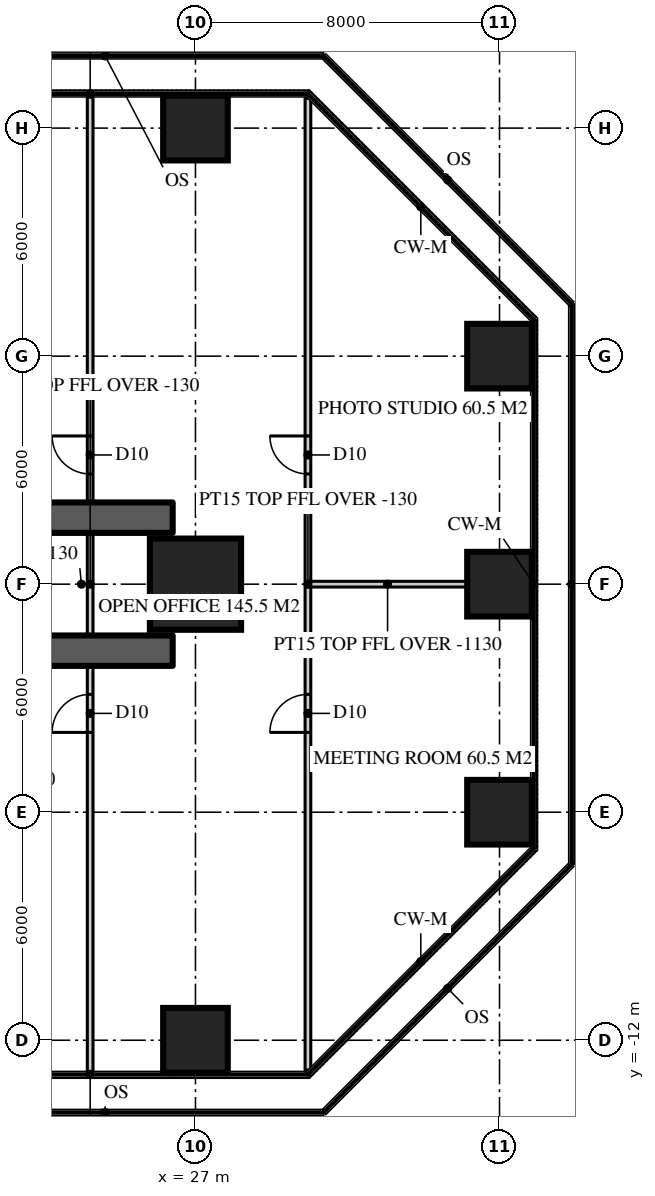
"""IFC4 building model, lengths in metres.
Left out: names, types, materials, properties, quantities, classifications, styles, units other than length and angle.
Written with IfcOpenShell. Run it as: python <this file> out.ifc"""

import sys

from ifc_helpers import new_model, si_unit, direction, frame, frame_2d, origin, origin_2d, place, context, subcontext, project, spatial, rectangle, extrude, element, fill, save


model = new_model("IFC4")
c1 = context("Model", 3, precision=1e-05, world=origin(), true_north=direction((0.0, 1.0)))
c2 = subcontext(c1, "Body", "Model", "MODEL_VIEW")
j1 = project(units=[si_unit("LENGTHUNIT", "METRE"), si_unit("PLANEANGLEUNIT", "RADIAN")], contexts=[c1])
p1 = place(None, origin())
s1 = spatial("IfcSite", under=j1, at=p1, CompositionType="ELEMENT")
p2 = place(p1, origin())
s2 = spatial("IfcBuilding", under=s1, at=p2, CompositionType="ELEMENT")
p3 = place(p2, frame((0.0, 0.0, 182.7)))
s3 = spatial("IfcBuildingStorey", under=s2, at=p3, CompositionType="ELEMENT", Elevation=182.7)
for number, where, z_axis, x_axis in (
    (1, (11.15, -1.75, 0.0), (0.0, 0.0, 1.0), (1.0, 0.0, 0.0)),
    (2, (11.15, 1.75, 0.0), (0.0, 0.0, 1.0), (1.0, 0.0, 0.0)),
):
    element("IfcWall", number, at=place(p3, frame(where, z_axis=z_axis, x_axis=x_axis)), inside=s3, PredefinedType="SHEAR", context=c2, shape_type="SweptSolid", body=[
        extrude(rectangle(XDim=15.25, YDim=0.8, at=frame_2d((7.625, 0.0))), origin(), (0.0, 0.0, 1.0), 3.9),
    ])
for number, where, z_axis, x_axis in (
    (3, (27.0, -12.0, 0.0), (0.0, 0.0, 1.0), (1.0, 0.0, 0.0)),
    (4, (35.0, -6.0, 0.0), (0.0, 0.0, 1.0), (1.0, 0.0, 0.0)),
):
    element("IfcColumn", number, at=place(p3, frame(where, z_axis=z_axis, x_axis=x_axis)), inside=s3, PredefinedType="COLUMN", context=c2, shape_type="SweptSolid", body=[
        extrude(rectangle(XDim=1.7, YDim=1.7, at=origin_2d()), origin(), (0.0, 0.0, 1.0), 3.9),
    ])
p4 = place(p3, frame((27.0, 0.0, 0.0), z_axis=(0.0, 0.0, 1.0), x_axis=(1.0, 0.0, 0.0)))
e5 = element("IfcColumn", 5, at=p4, inside=s3, PredefinedType="COLUMN", context=c2, shape_type="SweptSolid", body=[
    extrude(rectangle(XDim=2.4, YDim=2.4, at=origin_2d()), origin(), (0.0, 0.0, 1.0), 3.9),
])
for number, where, z_axis, x_axis in (
    (6, (35.0, 0.0, 0.0), (0.0, 0.0, 1.0), (1.0, 0.0, 0.0)),
    (7, (35.0, 6.0, 0.0), (0.0, 0.0, 1.0), (1.0, 0.0, 0.0)),
    (8, (27.0, 12.0, 0.0), (0.0, 0.0, 1.0), (1.0, 0.0, 0.0)),
):
    element("IfcColumn", number, at=place(p3, frame(where, z_axis=z_axis, x_axis=x_axis)), inside=s3, PredefinedType="COLUMN", context=c2, shape_type="SweptSolid", body=[
        extrude(rectangle(XDim=1.7, YDim=1.7, at=origin_2d()), origin(), (0.0, 0.0, 1.0), 3.9),
    ])
p5 = place(p3, frame((24.229, -12.82, 0.0), z_axis=(0.0, 0.0, 1.0), x_axis=(0.0, 1.0, 0.0)))
e9 = element("IfcWall", 9, at=p5, inside=s3, PredefinedType="PARTITIONING", context=c2, shape_type="SweptSolid", body=[
    extrude(rectangle(XDim=25.64, YDim=0.15, at=frame_2d((12.82, 0.0))), origin(), (0.0, 0.0, 1.0), 3.77),
])
p6 = place(p5, frame((15.72, 0.0, 0.0)))
e10 = element("IfcOpeningElement", 10, at=p6, cuts=e9, PredefinedType="OPENING", context=c2, shape_type="SweptSolid", body=[
    extrude(rectangle(XDim=1.0, YDim=2.2, at=frame_2d((0.5, 1.1))), frame((0.0, 0.085, 0.0), z_axis=(0.0, -1.0, 0.0), x_axis=(1.0, 0.0, 0.0)), (0.0, 0.0, 1.0), 0.17),
])
p7 = place(p5, frame((8.92, 0.0, 0.0)))
e11 = element("IfcOpeningElement", 11, at=p7, cuts=e9, PredefinedType="OPENING", context=c2, shape_type="SweptSolid", body=[
    extrude(rectangle(XDim=1.0, YDim=2.2, at=frame_2d((0.5, 1.1))), frame((0.0, 0.085, 0.0), z_axis=(0.0, -1.0, 0.0), x_axis=(1.0, 0.0, 0.0)), (0.0, 0.0, 1.0), 0.17),
])
p8 = place(p3, frame((29.959, -12.786, 0.0), z_axis=(0.0, 0.0, 1.0), x_axis=(0.0, 1.0, 0.0)))
e12 = element("IfcWall", 12, at=p8, inside=s3, PredefinedType="PARTITIONING", context=c2, shape_type="SweptSolid", body=[
    extrude(rectangle(XDim=25.573, YDim=0.15, at=frame_2d((12.786, 0.0))), origin(), (0.0, 0.0, 1.0), 3.77),
])
p9 = place(p8, frame((15.687, 0.0, 0.0)))
e13 = element("IfcOpeningElement", 13, at=p9, cuts=e12, PredefinedType="OPENING", context=c2, shape_type="SweptSolid", body=[
    extrude(rectangle(XDim=1.0, YDim=2.2, at=frame_2d((0.5, 1.1))), frame((0.0, 0.085, 0.0), z_axis=(0.0, -1.0, 0.0), x_axis=(1.0, 0.0, 0.0)), (0.0, 0.0, 1.0), 0.17),
])
p10 = place(p8, frame((8.886, 0.0, 0.0)))
e14 = element("IfcOpeningElement", 14, at=p10, cuts=e12, PredefinedType="OPENING", context=c2, shape_type="SweptSolid", body=[
    extrude(rectangle(XDim=1.0, YDim=2.2, at=frame_2d((0.5, 1.1))), frame((0.0, 0.085, 0.0), z_axis=(0.0, -1.0, 0.0), x_axis=(1.0, 0.0, 0.0)), (0.0, 0.0, 1.0), 0.17),
])
p11 = place(p3, frame((29.959, 0.0, 0.0), z_axis=(0.0, 0.0, 1.0), x_axis=(1.0, 0.0, 0.0)))
e15 = element("IfcWall", 15, at=p11, inside=s3, PredefinedType="PARTITIONING", context=c2, shape_type="SweptSolid", body=[
    extrude(rectangle(XDim=4.191, YDim=0.15, at=frame_2d((2.095, 0.0))), origin(), (0.0, 0.0, 1.0), 2.77),
])
p12 = place(p6, origin())
e16 = element("IfcDoor", 16, at=p12, inside=s3, OperationType="SINGLE_SWING_RIGHT", PredefinedType="DOOR", context=c2, shape_type="SweptSolid", body=[
    extrude(rectangle(XDim=1.0, YDim=2.2, at=frame_2d((0.5, 1.1))), frame((0.0, 0.025, 0.0), z_axis=(0.0, -1.0, 0.0), x_axis=(1.0, 0.0, 0.0)), (0.0, 0.0, 1.0), 0.05),
])
fill(e10, e16)
p13 = place(p7, origin())
e17 = element("IfcDoor", 17, at=p13, inside=s3, OperationType="SINGLE_SWING_LEFT", PredefinedType="DOOR", context=c2, shape_type="SweptSolid", body=[
    extrude(rectangle(XDim=1.0, YDim=2.2, at=frame_2d((0.5, 1.1))), frame((0.0, 0.025, 0.0), z_axis=(0.0, -1.0, 0.0), x_axis=(1.0, 0.0, 0.0)), (0.0, 0.0, 1.0), 0.05),
])
fill(e11, e17)
p14 = place(p9, origin())
e18 = element("IfcDoor", 18, at=p14, inside=s3, OperationType="SINGLE_SWING_RIGHT", PredefinedType="DOOR", context=c2, shape_type="SweptSolid", body=[
    extrude(rectangle(XDim=1.0, YDim=2.2, at=frame_2d((0.5, 1.1))), frame((0.0, 0.025, 0.0), z_axis=(0.0, -1.0, 0.0), x_axis=(1.0, 0.0, 0.0)), (0.0, 0.0, 1.0), 0.05),
])
fill(e13, e18)
p15 = place(p10, origin())
e19 = element("IfcDoor", 19, at=p15, inside=s3, OperationType="SINGLE_SWING_LEFT", PredefinedType="DOOR", context=c2, shape_type="SweptSolid", body=[
    extrude(rectangle(XDim=1.0, YDim=2.2, at=frame_2d((0.5, 1.1))), frame((0.0, 0.025, 0.0), z_axis=(0.0, -1.0, 0.0), x_axis=(1.0, 0.0, 0.0)), (0.0, 0.0, 1.0), 0.05),
])
fill(e14, e19)
save(model, sys.argv[1])
